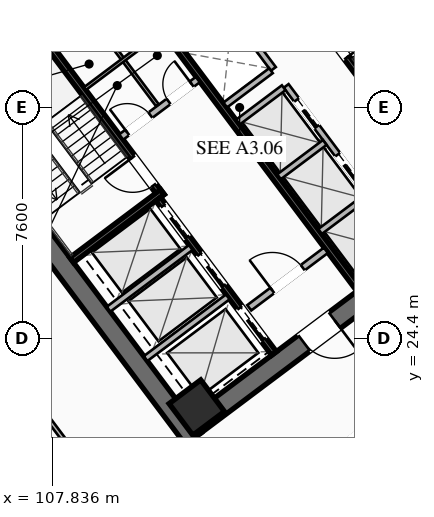
"""IFC4 building model, lengths in metres.
Left out: names, types, materials, properties, quantities, classifications, styles, units other than length and angle.
Written with IfcOpenShell. Run it as: python <this file> out.ifc"""

import sys

from ifc_helpers import new_model, si_unit, direction, frame, frame_2d, origin, origin_2d, place, context, subcontext, project, spatial, rectangle, hollow_rectangle, extrude, element, fill, save


model = new_model("IFC4")
c1 = context("Model", 3, precision=1e-05, world=origin(), true_north=direction((0.0, 1.0)))
c2 = subcontext(c1, "Body", "Model", "MODEL_VIEW")
j1 = project(units=[si_unit("LENGTHUNIT", "METRE"), si_unit("PLANEANGLEUNIT", "RADIAN")], contexts=[c1])
p1 = place(None, origin())
s1 = spatial("IfcSite", under=j1, at=p1, CompositionType="ELEMENT")
p2 = place(p1, origin())
s2 = spatial("IfcBuilding", under=s1, at=p2, CompositionType="ELEMENT")
p3 = place(p2, frame((0.0, 0.0, 74.3)))
s3 = spatial("IfcBuildingStorey", under=s2, at=p3, CompositionType="ELEMENT", Elevation=74.3)
for number, where, z_axis, x_axis in (
    (1, (112.476, 21.107, 0.0), (0.0, 0.0, 1.0), (-0.6, 0.8, 0.0)),
    (2, (115.524, 42.893, 0.0), (0.0, 0.0, 1.0), (0.6, -0.8, 0.0)),
):
    element("IfcWall", number, at=place(p3, frame(where, z_axis=z_axis, x_axis=x_axis)), inside=s3, PredefinedType="SHEAR", context=c2, shape_type="SweptSolid", body=[
        extrude(rectangle(XDim=15.6, YDim=0.65, at=frame_2d((7.8, 0.0))), origin(), (0.0, 0.0, 1.0), 3.55),
    ])
p4 = place(p3, frame((124.429, 30.478, 0.0), z_axis=(0.0, 0.0, 1.0), x_axis=(-0.799998028465, -0.600002628705, 0.0)))
e3 = element("IfcWall", 3, at=p4, inside=s3, PredefinedType="SHEAR", context=c2, shape_type="SweptSolid", body=[
    extrude(rectangle(XDim=14.86, YDim=0.65, at=frame_2d((7.43, 0.0))), origin(), (0.0, 0.0, 1.0), 3.55),
])
p5 = place(p4, frame((9.13, 0.0, 0.0)))
e4 = element("IfcOpeningElement", 4, at=p5, cuts=e3, PredefinedType="OPENING", context=c2, shape_type="SweptSolid", body=[
    extrude(rectangle(XDim=1.25, YDim=2.25, at=frame_2d((0.625, 1.125))), frame((0.0, 0.335, 0.0), z_axis=(0.0, -1.0, 0.0), x_axis=(1.0, 0.0, 0.0)), (0.0, 0.0, 1.0), 0.67),
])
p6 = place(p4, frame((4.08, 0.0, 0.0)))
e5 = element("IfcOpeningElement", 5, at=p6, cuts=e3, PredefinedType="OPENING", context=c2, shape_type="SweptSolid", body=[
    extrude(rectangle(XDim=1.25, YDim=2.25, at=frame_2d((0.625, 1.125))), frame((0.0, 0.335, 0.0), z_axis=(0.0, -1.0, 0.0), x_axis=(1.0, 0.0, 0.0)), (0.0, 0.0, 1.0), 0.67),
])
p7 = place(p3, frame((103.571, 33.522, 0.0), z_axis=(0.0, 0.0, 1.0), x_axis=(0.799998028465, 0.600002628705, 0.0)))
e6 = element("IfcWall", 6, at=p7, inside=s3, PredefinedType="SHEAR", context=c2, shape_type="SweptSolid", body=[
    extrude(rectangle(XDim=14.86, YDim=0.65, at=frame_2d((7.43, 0.0))), origin(), (0.0, 0.0, 1.0), 3.55),
])
p8 = place(p7, frame((4.48, 0.0, 0.0)))
e7 = element("IfcOpeningElement", 7, at=p8, cuts=e6, PredefinedType="OPENING", context=c2, shape_type="SweptSolid", body=[
    extrude(rectangle(XDim=1.25, YDim=2.25, at=frame_2d((0.625, 1.125))), frame((0.0, 0.335, 0.0), z_axis=(0.0, -1.0, 0.0), x_axis=(1.0, 0.0, 0.0)), (0.0, 0.0, 1.0), 0.67),
])
p9 = place(p7, frame((9.53, 0.0, 0.0)))
e8 = element("IfcOpeningElement", 8, at=p9, cuts=e6, PredefinedType="OPENING", context=c2, shape_type="SweptSolid", body=[
    extrude(rectangle(XDim=1.25, YDim=2.25, at=frame_2d((0.625, 1.125))), frame((0.0, 0.335, 0.0), z_axis=(0.0, -1.0, 0.0), x_axis=(1.0, 0.0, 0.0)), (0.0, 0.0, 1.0), 0.67),
])
p10 = place(p3, frame((112.59, 22.13, 0.0), z_axis=(0.0, 0.0, 1.0), x_axis=(0.799999996291, 0.600000004945, 0.0)))
e9 = element("IfcColumn", 9, at=p10, inside=s3, PredefinedType="COLUMN", context=c2, shape_type="SweptSolid", body=[
    extrude(hollow_rectangle(XDim=1.3, YDim=1.3, WallThickness=0.05, at=origin_2d()), origin(), (0.0, 0.0, 1.0), 3.35),
])
p11 = place(p3, frame((111.44, 29.08, 0.0), z_axis=(0.0, 0.0, 1.0), x_axis=(-0.600009827119, 0.799992629566, 0.0)))
e10 = element("IfcWall", 10, at=p11, inside=s3, PredefinedType="SHEAR", context=c2, shape_type="SweptSolid", body=[
    extrude(rectangle(XDim=7.95, YDim=0.2, at=frame_2d((3.975, 0.0))), origin(), (0.0, 0.0, 1.0), 3.35),
])
p12 = place(p11, frame((0.45, 0.0, 0.0)))
e11 = element("IfcOpeningElement", 11, at=p12, cuts=e10, PredefinedType="OPENING", context=c2, shape_type="SweptSolid", body=[
    extrude(rectangle(XDim=1.15, YDim=2.2, at=frame_2d((0.575, 1.1))), frame((0.0, 0.11, 0.0), z_axis=(0.0, -1.0, 0.0), x_axis=(1.0, 0.0, 0.0)), (0.0, 0.0, 1.0), 0.22),
])
p13 = place(p3, frame((108.476, 26.982, 0.0), z_axis=(0.0, 0.0, 1.0), x_axis=(0.799984290658, 0.600020945218, 0.0)))
e12 = element("IfcWall", 12, at=p13, inside=s3, PredefinedType="SHEAR", context=c2, shape_type="SweptSolid", body=[
    extrude(rectangle(XDim=3.73, YDim=0.2, at=frame_2d((1.865, 0.0))), origin(), (0.0, 0.0, 1.0), 3.35),
])
p14 = place(p3, frame((116.56, 34.92, 0.0), z_axis=(0.0, 0.0, 1.0), x_axis=(0.600009827119, -0.799992629566, 0.0)))
e13 = element("IfcWall", 13, at=p14, inside=s3, PredefinedType="SHEAR", context=c2, shape_type="SweptSolid", body=[
    extrude(rectangle(XDim=7.95, YDim=0.2, at=frame_2d((3.975, 0.0))), origin(), (0.0, 0.0, 1.0), 3.35),
])
p15 = place(p14, frame((0.45, 0.0, 0.0)))
e14 = element("IfcOpeningElement", 14, at=p15, cuts=e13, PredefinedType="OPENING", context=c2, shape_type="SweptSolid", body=[
    extrude(rectangle(XDim=1.15, YDim=2.2, at=frame_2d((0.575, 1.1))), frame((0.0, 0.11, 0.0), z_axis=(0.0, -1.0, 0.0), x_axis=(1.0, 0.0, 0.0)), (0.0, 0.0, 1.0), 0.22),
])
p16 = place(p3, frame((117.938, 26.016, 0.0), z_axis=(0.0, 0.0, 1.0), x_axis=(-0.600005463273, 0.799995902516, 0.0)))
e15 = element("IfcWall", 15, at=p16, inside=s3, PredefinedType="SHEAR", context=c2, shape_type="SweptSolid", body=[
    extrude(rectangle(XDim=14.3, YDim=0.2, at=frame_2d((7.15, 0.0))), origin(), (0.0, 0.0, 1.0), 3.35),
])
p17 = place(p3, frame((110.104, 31.028, 0.0), z_axis=(0.0, 0.0, 1.0), x_axis=(0.800018601094, 0.59997519774, 0.0)))
e16 = element("IfcWall", 16, at=p17, inside=s3, PredefinedType="SOLIDWALL", context=c2, shape_type="SweptSolid", body=[
    extrude(rectangle(XDim=3.15, YDim=0.22, at=frame_2d((1.575, 0.0))), origin(), (0.0, 0.0, 1.0), 2.703),
])
p18 = place(p17, frame((0.25, 0.0, 0.0)))
e17 = element("IfcOpeningElement", 17, at=p18, cuts=e16, PredefinedType="OPENING", context=c2, shape_type="SweptSolid", body=[
    extrude(rectangle(XDim=0.95, YDim=2.05, at=frame_2d((0.475, 1.025))), frame((0.0, 0.12, 0.0), z_axis=(0.0, -1.0, 0.0), x_axis=(1.0, 0.0, 0.0)), (0.0, 0.0, 1.0), 0.24),
])
p19 = place(p17, frame((1.95, 0.0, 0.0)))
e18 = element("IfcOpeningElement", 18, at=p19, cuts=e16, PredefinedType="OPENING", context=c2, shape_type="SweptSolid", body=[
    extrude(rectangle(XDim=0.95, YDim=2.05, at=frame_2d((0.475, 1.025))), frame((0.0, 0.12, 0.0), z_axis=(0.0, -1.0, 0.0), x_axis=(1.0, 0.0, 0.0)), (0.0, 0.0, 1.0), 0.24),
])
p20 = place(p3, frame((114.316, 25.412, 0.0), z_axis=(0.0, 0.0, 1.0), x_axis=(0.800018601094, 0.59997519774, 0.0)))
e19 = element("IfcWall", 19, at=p20, inside=s3, PredefinedType="SOLIDWALL", context=c2, shape_type="SweptSolid", body=[
    extrude(rectangle(XDim=3.15, YDim=0.22, at=frame_2d((1.575, 0.0))), origin(), (0.0, 0.0, 1.0), 2.703),
])
p21 = place(p20, frame((0.95, 0.0, 0.0)))
e20 = element("IfcOpeningElement", 20, at=p21, cuts=e19, PredefinedType="OPENING", context=c2, shape_type="SweptSolid", body=[
    extrude(rectangle(XDim=1.25, YDim=2.25, at=frame_2d((0.625, 1.125))), frame((0.0, 0.12, 0.0), z_axis=(0.0, -1.0, 0.0), x_axis=(1.0, 0.0, 0.0)), (0.0, 0.0, 1.0), 0.24),
])
p22 = place(p3, frame((115.13, 23.91, 0.0), z_axis=(0.0, 0.0, 1.0), x_axis=(-0.599975393228, 0.800018454488, 0.0)))
e21 = element("IfcWall", 21, at=p22, inside=s3, PredefinedType="SHEAR", context=c2, shape_type="SweptSolid", body=[
    extrude(rectangle(XDim=6.35, YDim=0.2, at=frame_2d((3.175, 0.0))), origin(), (0.0, 0.0, 1.0), 3.35),
])
p23 = place(p22, frame((4.775, 0.0, 0.0)))
e22 = element("IfcOpeningElement", 22, at=p23, cuts=e21, PredefinedType="OPENING", context=c2, shape_type="SweptSolid", body=[
    extrude(rectangle(XDim=1.3, YDim=2.25, at=frame_2d((0.65, 1.125))), frame((0.0, 0.11, 0.0), z_axis=(0.0, -1.0, 0.0), x_axis=(1.0, 0.0, 0.0)), (0.0, 0.0, 1.0), 0.22),
])
p24 = place(p22, frame((2.775, 0.0, 0.0)))
e23 = element("IfcOpeningElement", 23, at=p24, cuts=e21, PredefinedType="OPENING", context=c2, shape_type="SweptSolid", body=[
    extrude(rectangle(XDim=1.3, YDim=2.25, at=frame_2d((0.65, 1.125))), frame((0.0, 0.11, 0.0), z_axis=(0.0, -1.0, 0.0), x_axis=(1.0, 0.0, 0.0)), (0.0, 0.0, 1.0), 0.22),
])
p25 = place(p22, frame((0.575, 0.0, 0.0)))
e24 = element("IfcOpeningElement", 24, at=p25, cuts=e21, PredefinedType="OPENING", context=c2, shape_type="SweptSolid", body=[
    extrude(rectangle(XDim=1.3, YDim=2.25, at=frame_2d((0.65, 1.125))), frame((0.0, 0.11, 0.0), z_axis=(0.0, -1.0, 0.0), x_axis=(1.0, 0.0, 0.0)), (0.0, 0.0, 1.0), 0.22),
])
for number, where, z_axis, x_axis in (
    (25, (110.906, 23.742, 0.0), (0.0, 0.0, 1.0), (0.8, 0.6, 0.0)),
    (26, (109.688, 25.366, 0.0), (0.0, 0.0, 1.0), (0.8, 0.6, 0.0)),
):
    element("IfcWall", number, at=place(p3, frame(where, z_axis=z_axis, x_axis=x_axis)), inside=s3, PredefinedType="SOLIDWALL", context=c2, shape_type="SweptSolid", body=[
        extrude(rectangle(XDim=3.38, YDim=0.2, at=frame_2d((1.69, 0.0))), origin(), (0.0, 0.0, 1.0), 3.35),
    ])
p26 = place(p3, frame((111.296, 32.072, 0.0), z_axis=(0.0, 0.0, 1.0), x_axis=(-0.59995887973, 0.800030838552, 0.0)))
e27 = element("IfcWall", 27, at=p26, inside=s3, PredefinedType="PARTITIONING", context=c2, shape_type="SweptSolid", body=[
    extrude(rectangle(XDim=3.8, YDim=0.11, at=frame_2d((1.9, 0.0))), origin(), (0.0, 0.0, 1.0), 2.703),
])
p27 = place(p3, frame((108.91, 32.62, 0.0), z_axis=(0.0, 0.0, 1.0), x_axis=(0.800018601094, 0.59997519774, 0.0)))
e28 = element("IfcWall", 28, at=p27, inside=s3, PredefinedType="PARTITIONING", context=c2, shape_type="SweptSolid", body=[
    extrude(rectangle(XDim=3.15, YDim=0.11, at=frame_2d((1.575, 0.0))), origin(), (0.0, 0.0, 1.0), 2.703),
])
p28 = place(p3, frame((119.61, 27.27, 0.0), z_axis=(0.0, 0.0, 1.0), x_axis=(-0.600011488909, 0.79999138319, 0.0)))
e29 = element("IfcWall", 29, at=p28, inside=s3, PredefinedType="SOLIDWALL", context=c2, shape_type="SweptSolid", body=[
    extrude(rectangle(XDim=6.8, YDim=0.2, at=frame_2d((3.4, 0.0))), origin(), (0.0, 0.0, 1.0), 3.35),
])
p29 = place(p28, frame((0.625, 0.0, 0.0)))
e30 = element("IfcOpeningElement", 30, at=p29, cuts=e29, PredefinedType="OPENING", context=c2, shape_type="SweptSolid", body=[
    extrude(rectangle(XDim=1.1, YDim=2.2, at=frame_2d((0.55, 1.1))), frame((0.0, 0.11, 0.0), z_axis=(0.0, -1.0, 0.0), x_axis=(1.0, 0.0, 0.0)), (0.0, 0.0, 1.0), 0.22),
])
p30 = place(p28, frame((2.875, 0.0, 0.0)))
e31 = element("IfcOpeningElement", 31, at=p30, cuts=e29, PredefinedType="OPENING", context=c2, shape_type="SweptSolid", body=[
    extrude(rectangle(XDim=1.1, YDim=2.2, at=frame_2d((0.55, 1.1))), frame((0.0, 0.11, 0.0), z_axis=(0.0, -1.0, 0.0), x_axis=(1.0, 0.0, 0.0)), (0.0, 0.0, 1.0), 0.22),
])
p31 = place(p28, frame((5.125, 0.0, 0.0)))
e32 = element("IfcOpeningElement", 32, at=p31, cuts=e29, PredefinedType="OPENING", context=c2, shape_type="SweptSolid", body=[
    extrude(rectangle(XDim=1.1, YDim=2.2, at=frame_2d((0.55, 1.1))), frame((0.0, 0.11, 0.0), z_axis=(0.0, -1.0, 0.0), x_axis=(1.0, 0.0, 0.0)), (0.0, 0.0, 1.0), 0.22),
])
p32 = place(p3, frame((116.646, 27.922, 0.0), z_axis=(0.0, 0.0, 1.0), x_axis=(0.8, 0.6, 0.0)))
e33 = element("IfcWall", 33, at=p32, inside=s3, PredefinedType="SOLIDWALL", context=c2, shape_type="SweptSolid", body=[
    extrude(rectangle(XDim=1.88, YDim=0.2, at=frame_2d((0.94, 0.0))), origin(), (0.0, 0.0, 1.0), 3.35),
])
p33 = place(p3, frame((115.296, 29.722, 0.0), z_axis=(0.0, 0.0, 1.0), x_axis=(0.799984418148, 0.600020775241, 0.0)))
e34 = element("IfcWall", 34, at=p33, inside=s3, PredefinedType="SOLIDWALL", context=c2, shape_type="SweptSolid", body=[
    extrude(rectangle(XDim=1.88, YDim=0.2, at=frame_2d((0.94, 0.0))), origin(), (0.0, 0.0, 1.0), 3.35),
])
p34 = place(p3, frame((113.946, 31.522, 0.0), z_axis=(0.0, 0.0, 1.0), x_axis=(0.8, 0.6, 0.0)))
e35 = element("IfcWall", 35, at=p34, inside=s3, PredefinedType="SOLIDWALL", context=c2, shape_type="SweptSolid", body=[
    extrude(rectangle(XDim=1.88, YDim=0.2, at=frame_2d((0.94, 0.0))), origin(), (0.0, 0.0, 1.0), 3.35),
])
p35 = place(p3, frame((115.11, 33.27, 0.0), z_axis=(0.0, 0.0, 1.0), x_axis=(-0.600011488909, 0.79999138319, 0.0)))
e36 = element("IfcWall", 36, at=p35, inside=s3, PredefinedType="SOLIDWALL", context=c2, shape_type="SweptSolid", body=[
    extrude(rectangle(XDim=6.8, YDim=0.2, at=frame_2d((3.4, 0.0))), origin(), (0.0, 0.0, 1.0), 3.35),
])
p36 = place(p3, frame((113.526, 32.082, 0.0), z_axis=(0.0, 0.0, 1.0), x_axis=(0.800046745961, 0.599937666993, 0.0)))
e37 = element("IfcWall", 37, at=p36, inside=s3, PredefinedType="SOLIDWALL", context=c2, shape_type="SweptSolid", body=[
    extrude(rectangle(XDim=1.88, YDim=0.2, at=frame_2d((0.94, 0.0))), origin(), (0.0, 0.0, 1.0), 3.35),
])
p37 = place(p3, frame((112.176, 33.882, 0.0), z_axis=(0.0, 0.0, 1.0), x_axis=(0.8, 0.6, 0.0)))
e38 = element("IfcWall", 38, at=p37, inside=s3, PredefinedType="SOLIDWALL", context=c2, shape_type="SweptSolid", body=[
    extrude(rectangle(XDim=1.88, YDim=0.2, at=frame_2d((0.94, 0.0))), origin(), (0.0, 0.0, 1.0), 3.35),
])
p38 = place(p3, frame((134.18, 33.51, 0.0), z_axis=(0.0, 0.0, 1.0), x_axis=(-0.8, -0.6, 0.0)))
e39 = element("IfcWall", 39, at=p38, inside=s3, PredefinedType="PARTITIONING", context=c2, shape_type="SweptSolid", body=[
    extrude(rectangle(XDim=28.23, YDim=0.135, at=frame_2d((14.115, 0.0))), origin(), (0.0, 0.0, 1.0), 2.703),
])
p39 = place(p38, frame((26.9, 0.0, 0.0)))
e40 = element("IfcOpeningElement", 40, at=p39, cuts=e39, PredefinedType="OPENING", context=c2, shape_type="SweptSolid", body=[
    extrude(rectangle(XDim=0.95, YDim=2.05, at=frame_2d((0.475, 1.025))), frame((0.0, 0.077, 0.0), z_axis=(0.0, -1.0, 0.0), x_axis=(1.0, 0.0, 0.0)), (0.0, 0.0, 1.0), 0.155),
])
p40 = place(p38, frame((20.399, 0.0, 0.0)))
e41 = element("IfcOpeningElement", 41, at=p40, cuts=e39, PredefinedType="OPENING", context=c2, shape_type="SweptSolid", body=[
    extrude(rectangle(XDim=0.95, YDim=2.05, at=frame_2d((0.475, 1.025))), frame((0.0, 0.077, 0.0), z_axis=(0.0, -1.0, 0.0), x_axis=(1.0, 0.0, 0.0)), (0.0, 0.0, 1.0), 0.155),
])
p41 = place(p38, frame((16.339, 0.0, 0.0)))
e42 = element("IfcOpeningElement", 42, at=p41, cuts=e39, PredefinedType="OPENING", context=c2, shape_type="SweptSolid", body=[
    extrude(rectangle(XDim=0.95, YDim=2.05, at=frame_2d((0.475, 1.025))), frame((0.0, 0.077, 0.0), z_axis=(0.0, -1.0, 0.0), x_axis=(1.0, 0.0, 0.0)), (0.0, 0.0, 1.0), 0.155),
])
p42 = place(p38, frame((0.38, 0.0, 0.0)))
e43 = element("IfcOpeningElement", 43, at=p42, cuts=e39, PredefinedType="OPENING", context=c2, shape_type="SweptSolid", body=[
    extrude(rectangle(XDim=0.95, YDim=2.05, at=frame_2d((0.475, 1.025))), frame((0.0, 0.077, 0.0), z_axis=(0.0, -1.0, 0.0), x_axis=(1.0, 0.0, 0.0)), (0.0, 0.0, 1.0), 0.155),
])
p43 = place(p3, frame((111.548, 16.636, 0.0), z_axis=(0.0, 0.0, 1.0), x_axis=(-0.600003610192, 0.799997292343, 0.0)))
e44 = element("IfcWall", 44, at=p43, inside=s3, PredefinedType="PARTITIONING", context=c2, shape_type="SweptSolid", body=[
    extrude(rectangle(XDim=21.64, YDim=0.135, at=frame_2d((10.82, 0.0))), origin(), (0.0, 0.0, 1.0), 2.703),
])
p44 = place(p43, frame((0.3, 0.0, 0.0)))
e45 = element("IfcOpeningElement", 45, at=p44, cuts=e44, PredefinedType="OPENING", context=c2, shape_type="SweptSolid", body=[
    extrude(rectangle(XDim=0.95, YDim=2.05, at=frame_2d((0.475, 1.025))), frame((0.0, 0.077, 0.0), z_axis=(0.0, -1.0, 0.0), x_axis=(1.0, 0.0, 0.0)), (0.0, 0.0, 1.0), 0.155),
])
p45 = place(p5, origin())
e46 = element("IfcDoor", 46, at=p45, inside=s3, OperationType="SINGLE_SWING_LEFT", PredefinedType="DOOR", context=c2, shape_type="SweptSolid", body=[
    extrude(rectangle(XDim=1.25, YDim=2.25, at=frame_2d((0.625, 1.125))), frame((0.0, 0.025, 0.0), z_axis=(0.0, -1.0, 0.0), x_axis=(1.0, 0.0, 0.0)), (0.0, 0.0, 1.0), 0.05),
])
fill(e4, e46)
p46 = place(p12, origin())
e47 = element("IfcDoor", 47, at=p46, inside=s3, OperationType="SINGLE_SWING_RIGHT", PredefinedType="DOOR", context=c2, shape_type="SweptSolid", body=[
    extrude(rectangle(XDim=1.15, YDim=2.2, at=frame_2d((0.575, 1.1))), frame((0.0, 0.025, 0.0), z_axis=(0.0, -1.0, 0.0), x_axis=(1.0, 0.0, 0.0)), (0.0, 0.0, 1.0), 0.05),
])
fill(e11, e47)
p47 = place(p15, origin())
e48 = element("IfcDoor", 48, at=p47, inside=s3, OperationType="SINGLE_SWING_RIGHT", PredefinedType="DOOR", context=c2, shape_type="SweptSolid", body=[
    extrude(rectangle(XDim=1.15, YDim=2.2, at=frame_2d((0.575, 1.1))), frame((0.0, 0.025, 0.0), z_axis=(0.0, -1.0, 0.0), x_axis=(1.0, 0.0, 0.0)), (0.0, 0.0, 1.0), 0.05),
])
fill(e14, e48)
p48 = place(p21, origin())
e49 = element("IfcDoor", 49, at=p48, inside=s3, OperationType="SINGLE_SWING_LEFT", PredefinedType="DOOR", context=c2, shape_type="SweptSolid", body=[
    extrude(rectangle(XDim=1.25, YDim=2.25, at=frame_2d((0.625, 1.125))), frame((0.0, 0.025, 0.0), z_axis=(0.0, -1.0, 0.0), x_axis=(1.0, 0.0, 0.0)), (0.0, 0.0, 1.0), 0.05),
])
fill(e20, e49)
p49 = place(p18, origin())
e50 = element("IfcDoor", 50, at=p49, inside=s3, OperationType="SINGLE_SWING_LEFT", PredefinedType="DOOR", context=c2, shape_type="SweptSolid", body=[
    extrude(rectangle(XDim=0.95, YDim=2.05, at=frame_2d((0.475, 1.025))), frame((0.0, 0.025, 0.0), z_axis=(0.0, -1.0, 0.0), x_axis=(1.0, 0.0, 0.0)), (0.0, 0.0, 1.0), 0.05),
])
fill(e17, e50)
p50 = place(p19, origin())
e51 = element("IfcDoor", 51, at=p50, inside=s3, OperationType="SINGLE_SWING_RIGHT", PredefinedType="DOOR", context=c2, shape_type="SweptSolid", body=[
    extrude(rectangle(XDim=0.95, YDim=2.05, at=frame_2d((0.475, 1.025))), frame((0.0, 0.025, 0.0), z_axis=(0.0, -1.0, 0.0), x_axis=(1.0, 0.0, 0.0)), (0.0, 0.0, 1.0), 0.05),
])
fill(e18, e51)
p51 = place(p40, origin())
e52 = element("IfcDoor", 52, at=p51, inside=s3, OperationType="SINGLE_SWING_RIGHT", PredefinedType="DOOR", context=c2, shape_type="SweptSolid", body=[
    extrude(rectangle(XDim=0.95, YDim=2.05, at=frame_2d((0.475, 1.025))), frame((0.0, 0.025, 0.0), z_axis=(0.0, -1.0, 0.0), x_axis=(1.0, 0.0, 0.0)), (0.0, 0.0, 1.0), 0.05),
])
fill(e41, e52)
p52 = place(p23, origin())
e53 = element("IfcDoor", 53, at=p52, inside=s3, OperationType="SLIDING_TO_LEFT", PredefinedType="DOOR", context=c2, shape_type="SweptSolid", body=[
    extrude(rectangle(XDim=1.3, YDim=2.25, at=frame_2d((0.65, 1.125))), frame((0.0, 0.025, 0.0), z_axis=(0.0, -1.0, 0.0), x_axis=(1.0, 0.0, 0.0)), (0.0, 0.0, 1.0), 0.05),
])
fill(e22, e53)
p53 = place(p24, origin())
e54 = element("IfcDoor", 54, at=p53, inside=s3, OperationType="SLIDING_TO_LEFT", PredefinedType="DOOR", context=c2, shape_type="SweptSolid", body=[
    extrude(rectangle(XDim=1.3, YDim=2.25, at=frame_2d((0.65, 1.125))), frame((0.0, 0.025, 0.0), z_axis=(0.0, -1.0, 0.0), x_axis=(1.0, 0.0, 0.0)), (0.0, 0.0, 1.0), 0.05),
])
fill(e23, e54)
p54 = place(p25, origin())
e55 = element("IfcDoor", 55, at=p54, inside=s3, OperationType="SLIDING_TO_LEFT", PredefinedType="DOOR", context=c2, shape_type="SweptSolid", body=[
    extrude(rectangle(XDim=1.3, YDim=2.25, at=frame_2d((0.65, 1.125))), frame((0.0, 0.025, 0.0), z_axis=(0.0, -1.0, 0.0), x_axis=(1.0, 0.0, 0.0)), (0.0, 0.0, 1.0), 0.05),
])
fill(e24, e55)
p55 = place(p30, origin())
e56 = element("IfcDoor", 56, at=p55, inside=s3, OperationType="SLIDING_TO_LEFT", PredefinedType="DOOR", context=c2, shape_type="SweptSolid", body=[
    extrude(rectangle(XDim=1.1, YDim=2.2, at=frame_2d((0.55, 1.1))), frame((0.0, 0.025, 0.0), z_axis=(0.0, -1.0, 0.0), x_axis=(1.0, 0.0, 0.0)), (0.0, 0.0, 1.0), 0.05),
])
fill(e31, e56)
p56 = place(p31, origin())
e57 = element("IfcDoor", 57, at=p56, inside=s3, OperationType="SLIDING_TO_LEFT", PredefinedType="DOOR", context=c2, shape_type="SweptSolid", body=[
    extrude(rectangle(XDim=1.1, YDim=2.2, at=frame_2d((0.55, 1.1))), frame((0.0, 0.025, 0.0), z_axis=(0.0, -1.0, 0.0), x_axis=(1.0, 0.0, 0.0)), (0.0, 0.0, 1.0), 0.05),
])
fill(e32, e57)
save(model, sys.argv[1])
